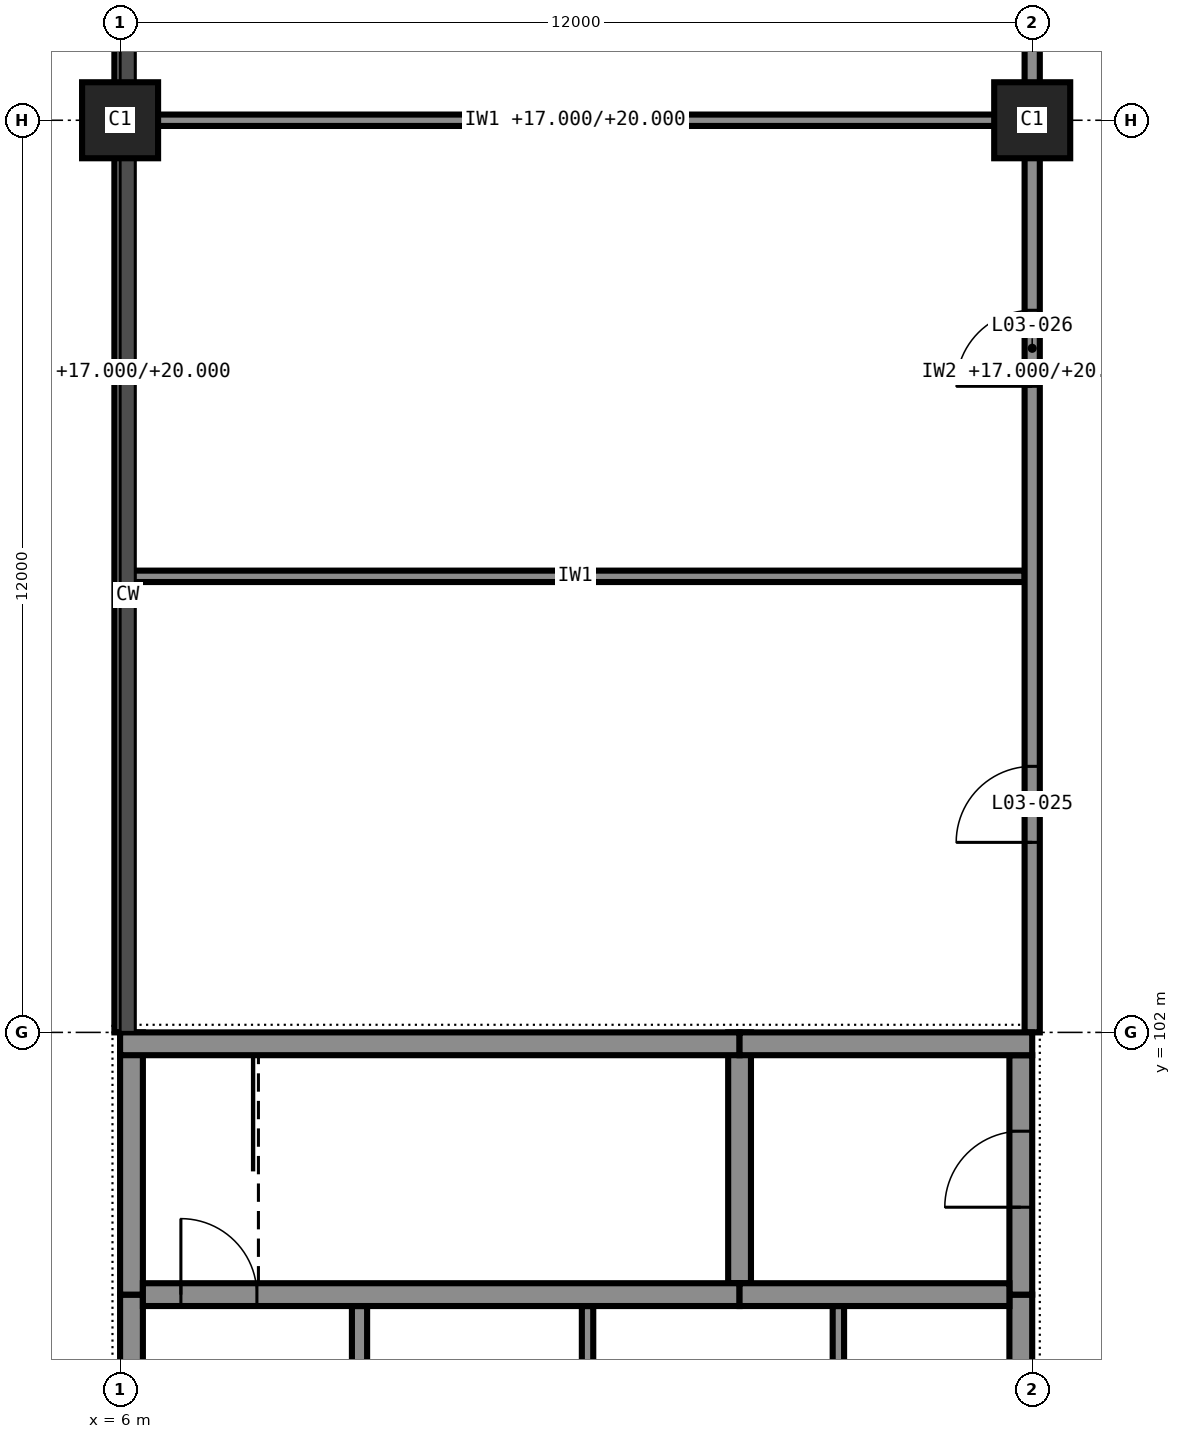
"""IFC4 building model, lengths in metres.
Left out: names, types, materials, properties, quantities, classifications, styles, units other than length and angle.
Written with IfcOpenShell. Run it as: python <this file> out.ifc"""

import sys

from ifc_helpers import new_model, si_unit, direction, frame, frame_2d, origin, origin_2d, place, context, subcontext, project, spatial, rectangle, extrude, element, fill, save


model = new_model("IFC4")
c1 = context("Model", 3, precision=1e-05, world=origin(), true_north=direction((0.0, 1.0)))
c2 = subcontext(c1, "Body", "Model", "MODEL_VIEW")
j1 = project(units=[si_unit("LENGTHUNIT", "METRE"), si_unit("PLANEANGLEUNIT", "RADIAN")], contexts=[c1])
p1 = place(None, origin())
s1 = spatial("IfcSite", under=j1, at=p1, CompositionType="ELEMENT")
p2 = place(p1, origin())
s2 = spatial("IfcBuilding", under=s1, at=p2, CompositionType="ELEMENT")
p3 = place(p2, frame((0.0, 0.0, 17.0)))
s3 = spatial("IfcBuildingStorey", under=s2, at=p3, CompositionType="ELEMENT", Elevation=17.0)
for number, where, z_axis, x_axis in (
    (1, (6.0, 114.0, 0.0), (0.0, 0.0, 1.0), (1.0, 0.0, 0.0)),
    (2, (18.0, 114.0, 0.0), (0.0, 0.0, 1.0), (1.0, 0.0, 0.0)),
):
    element("IfcColumn", number, at=place(p3, frame(where, z_axis=z_axis, x_axis=x_axis)), inside=s3, PredefinedType="COLUMN", context=c2, shape_type="SweptSolid", body=[
        extrude(rectangle(XDim=1.0, YDim=1.0, at=origin_2d()), origin(), (0.0, 0.0, 1.0), 4.0),
    ])
p4 = place(p3, frame((6.0, 101.85, 0.0), z_axis=(0.0, 0.0, 1.0), x_axis=(1.0, 0.0, 0.0)))
e3 = element("IfcWall", 3, at=p4, inside=s3, PredefinedType="SHEAR", context=c2, shape_type="SweptSolid", body=[
    extrude(rectangle(XDim=8.15, YDim=0.3, at=frame_2d((4.075, 0.0))), origin(), (0.0, 0.0, 1.0), 3.8),
])
p5 = place(p3, frame((14.15, 101.85, 0.0), z_axis=(0.0, 0.0, 1.0), x_axis=(1.0, 0.0, 0.0)))
e4 = element("IfcWall", 4, at=p5, inside=s3, PredefinedType="SHEAR", context=c2, shape_type="SweptSolid", body=[
    extrude(rectangle(XDim=3.85, YDim=0.3, at=frame_2d((1.925, 0.0))), origin(), (0.0, 0.0, 1.0), 3.8),
])
p6 = place(p3, frame((6.3, 98.55, 0.0), z_axis=(0.0, 0.0, 1.0), x_axis=(1.0, 0.0, 0.0)))
e5 = element("IfcWall", 5, at=p6, inside=s3, PredefinedType="SHEAR", context=c2, shape_type="SweptSolid", body=[
    extrude(rectangle(XDim=7.85, YDim=0.3, at=frame_2d((3.925, 0.0))), origin(), (0.0, 0.0, 1.0), 3.8),
])
p7 = place(p6, frame((0.5, 0.0, 0.0)))
e6 = element("IfcOpeningElement", 6, at=p7, cuts=e5, PredefinedType="OPENING", context=c2, shape_type="SweptSolid", body=[
    extrude(rectangle(XDim=1.0, YDim=2.1, at=frame_2d((0.5, 1.05))), frame((0.0, 0.16, 0.0), z_axis=(0.0, -1.0, 0.0), x_axis=(1.0, 0.0, 0.0)), (0.0, 0.0, 1.0), 0.32),
])
p8 = place(p3, frame((14.15, 98.55, 0.0), z_axis=(0.0, 0.0, 1.0), x_axis=(1.0, 0.0, 0.0)))
e7 = element("IfcWall", 7, at=p8, inside=s3, PredefinedType="SHEAR", context=c2, shape_type="SweptSolid", body=[
    extrude(rectangle(XDim=3.55, YDim=0.3, at=frame_2d((1.775, 0.0))), origin(), (0.0, 0.0, 1.0), 3.8),
])
p9 = place(p3, frame((6.15, 93.45, 0.0), z_axis=(0.0, 0.0, 1.0), x_axis=(0.0, 1.0, 0.0)))
e8 = element("IfcWall", 8, at=p9, inside=s3, PredefinedType="SHEAR", context=c2, shape_type="SweptSolid", body=[
    extrude(rectangle(XDim=5.1, YDim=0.3, at=frame_2d((2.55, 0.0))), origin(), (0.0, 0.0, 1.0), 3.8),
])
p10 = place(p3, frame((6.15, 98.55, 0.0), z_axis=(0.0, 0.0, 1.0), x_axis=(0.0, 1.0, 0.0)))
e9 = element("IfcWall", 9, at=p10, inside=s3, PredefinedType="SHEAR", context=c2, shape_type="SweptSolid", body=[
    extrude(rectangle(XDim=3.45, YDim=0.3, at=frame_2d((1.725, 0.0))), origin(), (0.0, 0.0, 1.0), 3.8),
])
p11 = place(p3, frame((17.85, 93.45, 0.0), z_axis=(0.0, 0.0, 1.0), x_axis=(0.0, 1.0, 0.0)))
e10 = element("IfcWall", 10, at=p11, inside=s3, PredefinedType="SHEAR", context=c2, shape_type="SweptSolid", body=[
    extrude(rectangle(XDim=5.1, YDim=0.3, at=frame_2d((2.55, 0.0))), origin(), (0.0, 0.0, 1.0), 3.8),
])
p12 = place(p11, frame((0.3, 0.0, 0.0)))
e11 = element("IfcOpeningElement", 11, at=p12, cuts=e10, PredefinedType="OPENING", context=c2, shape_type="SweptSolid", body=[
    extrude(rectangle(XDim=1.5, YDim=2.1, at=frame_2d((0.75, 1.05))), frame((0.0, 0.16, 0.0), z_axis=(0.0, -1.0, 0.0), x_axis=(1.0, 0.0, 0.0)), (0.0, 0.0, 1.0), 0.32),
])
p13 = place(p3, frame((17.85, 98.55, 0.0), z_axis=(0.0, 0.0, 1.0), x_axis=(0.0, 1.0, 0.0)))
e12 = element("IfcWall", 12, at=p13, inside=s3, PredefinedType="SHEAR", context=c2, shape_type="SweptSolid", body=[
    extrude(rectangle(XDim=3.15, YDim=0.3, at=frame_2d((1.575, 0.0))), origin(), (0.0, 0.0, 1.0), 3.8),
])
p14 = place(p13, frame((1.15, 0.0, 0.0)))
e13 = element("IfcOpeningElement", 13, at=p14, cuts=e12, PredefinedType="OPENING", context=c2, shape_type="SweptSolid", body=[
    extrude(rectangle(XDim=1.0, YDim=2.1, at=frame_2d((0.5, 1.05))), frame((0.0, 0.16, 0.0), z_axis=(0.0, -1.0, 0.0), x_axis=(1.0, 0.0, 0.0)), (0.0, 0.0, 1.0), 0.32),
])
p15 = place(p3, frame((14.15, 98.7, 0.0), z_axis=(0.0, 0.0, 1.0), x_axis=(0.0, 1.0, 0.0)))
e14 = element("IfcWall", 14, at=p15, inside=s3, PredefinedType="SHEAR", context=c2, shape_type="SweptSolid", body=[
    extrude(rectangle(XDim=3.3, YDim=0.3, at=frame_2d((1.65, 0.0))), origin(), (0.0, 0.0, 1.0), 3.8),
])
p16 = place(p3, frame((6.075, 108.0, 0.0), z_axis=(0.0, 0.0, 1.0), x_axis=(1.0, 0.0, 0.0)))
e15 = element("IfcWall", 15, at=p16, inside=s3, PredefinedType="PARTITIONING", context=c2, shape_type="SweptSolid", body=[
    extrude(rectangle(XDim=11.825, YDim=0.15, at=frame_2d((5.913, 0.0))), origin(), (0.0, 0.0, 1.0), 3.8),
])
p17 = place(p3, frame((6.075, 114.0, 0.0), z_axis=(0.0, 0.0, 1.0), x_axis=(1.0, 0.0, 0.0)))
e16 = element("IfcWall", 16, at=p17, inside=s3, PredefinedType="PARTITIONING", context=c2, shape_type="SweptSolid", body=[
    extrude(rectangle(XDim=11.825, YDim=0.15, at=frame_2d((5.913, 0.0))), origin(), (0.0, 0.0, 1.0), 3.0),
])
p18 = place(p3, frame((6.0, 102.0, 0.0), z_axis=(0.0, 0.0, 1.0), x_axis=(0.0, 1.0, 0.0)))
e17 = element("IfcWall", 17, at=p18, inside=s3, PredefinedType="PARTITIONING", context=c2, shape_type="SweptSolid", body=[
    extrude(rectangle(XDim=48.0, YDim=0.15, at=frame_2d((24.0, 0.0))), origin(), (0.0, 0.0, 1.0), 3.0),
])
p19 = place(p3, frame((9.15, 95.65, 0.0), z_axis=(0.0, 0.0, 1.0), x_axis=(0.0, 1.0, 0.0)))
e18 = element("IfcWall", 18, at=p19, inside=s3, PredefinedType="PARTITIONING", context=c2, shape_type="SweptSolid", body=[
    extrude(rectangle(XDim=2.75, YDim=0.2, at=frame_2d((1.375, 0.0))), origin(), (0.0, 0.0, 1.0), 3.8),
])
for number, where, z_axis, x_axis in (
    (19, (12.15, 95.65, 0.0), (0.0, 0.0, 1.0), (0.0, 1.0, 0.0)),
    (20, (15.45, 95.65, 0.0), (0.0, 0.0, 1.0), (0.0, 1.0, 0.0)),
):
    element("IfcWall", number, at=place(p3, frame(where, z_axis=z_axis, x_axis=x_axis)), inside=s3, PredefinedType="PARTITIONING", context=c2, shape_type="SweptSolid", body=[
        extrude(rectangle(XDim=2.75, YDim=0.15, at=frame_2d((1.375, 0.0))), origin(), (0.0, 0.0, 1.0), 3.8),
    ])
p20 = place(p3, frame((18.0, 102.0, 0.0), z_axis=(0.0, 0.0, 1.0), x_axis=(0.0, 1.0, 0.0)))
e21 = element("IfcWall", 21, at=p20, inside=s3, PredefinedType="PARTITIONING", context=c2, shape_type="SweptSolid", body=[
    extrude(rectangle(XDim=48.0, YDim=0.2, at=frame_2d((24.0, 0.0))), origin(), (0.0, 0.0, 1.0), 3.0),
])
p21 = place(p20, frame((2.5, 0.0, 0.0)))
e22 = element("IfcOpeningElement", 22, at=p21, cuts=e21, PredefinedType="OPENING", context=c2, shape_type="SweptSolid", body=[
    extrude(rectangle(XDim=1.0, YDim=2.1, at=frame_2d((0.5, 1.05))), frame((0.0, 0.11, 0.0), z_axis=(0.0, -1.0, 0.0), x_axis=(1.0, 0.0, 0.0)), (0.0, 0.0, 1.0), 0.22),
])
p22 = place(p20, frame((8.5, 0.0, 0.0)))
e23 = element("IfcOpeningElement", 23, at=p22, cuts=e21, PredefinedType="OPENING", context=c2, shape_type="SweptSolid", body=[
    extrude(rectangle(XDim=1.0, YDim=2.1, at=frame_2d((0.5, 1.05))), frame((0.0, 0.11, 0.0), z_axis=(0.0, -1.0, 0.0), x_axis=(1.0, 0.0, 0.0)), (0.0, 0.0, 1.0), 0.22),
])
p23 = place(p20, frame((14.5, 0.0, 0.0)))
e24 = element("IfcOpeningElement", 24, at=p23, cuts=e21, PredefinedType="OPENING", context=c2, shape_type="SweptSolid", body=[
    extrude(rectangle(XDim=1.0, YDim=2.1, at=frame_2d((0.5, 1.05))), frame((0.0, 0.11, 0.0), z_axis=(0.0, -1.0, 0.0), x_axis=(1.0, 0.0, 0.0)), (0.0, 0.0, 1.0), 0.22),
])
p24 = place(p20, frame((20.5, 0.0, 0.0)))
e25 = element("IfcOpeningElement", 25, at=p24, cuts=e21, PredefinedType="OPENING", context=c2, shape_type="SweptSolid", body=[
    extrude(rectangle(XDim=1.0, YDim=2.1, at=frame_2d((0.5, 1.05))), frame((0.0, 0.11, 0.0), z_axis=(0.0, -1.0, 0.0), x_axis=(1.0, 0.0, 0.0)), (0.0, 0.0, 1.0), 0.22),
])
p25 = place(p20, frame((26.5, 0.0, 0.0)))
e26 = element("IfcOpeningElement", 26, at=p25, cuts=e21, PredefinedType="OPENING", context=c2, shape_type="SweptSolid", body=[
    extrude(rectangle(XDim=1.0, YDim=2.1, at=frame_2d((0.5, 1.05))), frame((0.0, 0.11, 0.0), z_axis=(0.0, -1.0, 0.0), x_axis=(1.0, 0.0, 0.0)), (0.0, 0.0, 1.0), 0.22),
])
p26 = place(p20, frame((32.5, 0.0, 0.0)))
e27 = element("IfcOpeningElement", 27, at=p26, cuts=e21, PredefinedType="OPENING", context=c2, shape_type="SweptSolid", body=[
    extrude(rectangle(XDim=1.0, YDim=2.1, at=frame_2d((0.5, 1.05))), frame((0.0, 0.11, 0.0), z_axis=(0.0, -1.0, 0.0), x_axis=(1.0, 0.0, 0.0)), (0.0, 0.0, 1.0), 0.22),
])
p27 = place(p20, frame((38.5, 0.0, 0.0)))
e28 = element("IfcOpeningElement", 28, at=p27, cuts=e21, PredefinedType="OPENING", context=c2, shape_type="SweptSolid", body=[
    extrude(rectangle(XDim=1.0, YDim=2.1, at=frame_2d((0.5, 1.05))), frame((0.0, 0.11, 0.0), z_axis=(0.0, -1.0, 0.0), x_axis=(1.0, 0.0, 0.0)), (0.0, 0.0, 1.0), 0.22),
])
p28 = place(p20, frame((44.5, 0.0, 0.0)))
e29 = element("IfcOpeningElement", 29, at=p28, cuts=e21, PredefinedType="OPENING", context=c2, shape_type="SweptSolid", body=[
    extrude(rectangle(XDim=1.0, YDim=2.1, at=frame_2d((0.5, 1.05))), frame((0.0, 0.11, 0.0), z_axis=(0.0, -1.0, 0.0), x_axis=(1.0, 0.0, 0.0)), (0.0, 0.0, 1.0), 0.22),
])
p29 = place(p7, origin())
e30 = element("IfcDoor", 30, at=p29, inside=s3, OperationType="SINGLE_SWING_RIGHT", PredefinedType="DOOR", context=c2, shape_type="SweptSolid", body=[
    extrude(rectangle(XDim=1.0, YDim=2.1, at=frame_2d((0.5, 1.05))), frame((0.0, 0.025, 0.0), z_axis=(0.0, -1.0, 0.0), x_axis=(1.0, 0.0, 0.0)), (0.0, 0.0, 1.0), 0.05),
])
fill(e6, e30)
p30 = place(p14, origin())
e31 = element("IfcDoor", 31, at=p30, inside=s3, OperationType="SINGLE_SWING_RIGHT", PredefinedType="DOOR", context=c2, shape_type="SweptSolid", body=[
    extrude(rectangle(XDim=1.0, YDim=2.1, at=frame_2d((0.5, 1.05))), frame((0.0, 0.025, 0.0), z_axis=(0.0, -1.0, 0.0), x_axis=(1.0, 0.0, 0.0)), (0.0, 0.0, 1.0), 0.05),
])
fill(e13, e31)
p31 = place(p21, origin())
e32 = element("IfcDoor", 32, at=p31, inside=s3, OperationType="SINGLE_SWING_RIGHT", PredefinedType="DOOR", context=c2, shape_type="SweptSolid", body=[
    extrude(rectangle(XDim=1.0, YDim=2.1, at=frame_2d((0.5, 1.05))), frame((0.0, 0.025, 0.0), z_axis=(0.0, -1.0, 0.0), x_axis=(1.0, 0.0, 0.0)), (0.0, 0.0, 1.0), 0.05),
])
fill(e22, e32)
p32 = place(p22, origin())
e33 = element("IfcDoor", 33, at=p32, inside=s3, OperationType="SINGLE_SWING_RIGHT", PredefinedType="DOOR", context=c2, shape_type="SweptSolid", body=[
    extrude(rectangle(XDim=1.0, YDim=2.1, at=frame_2d((0.5, 1.05))), frame((0.0, 0.025, 0.0), z_axis=(0.0, -1.0, 0.0), x_axis=(1.0, 0.0, 0.0)), (0.0, 0.0, 1.0), 0.05),
])
fill(e23, e33)
save(model, sys.argv[1])
